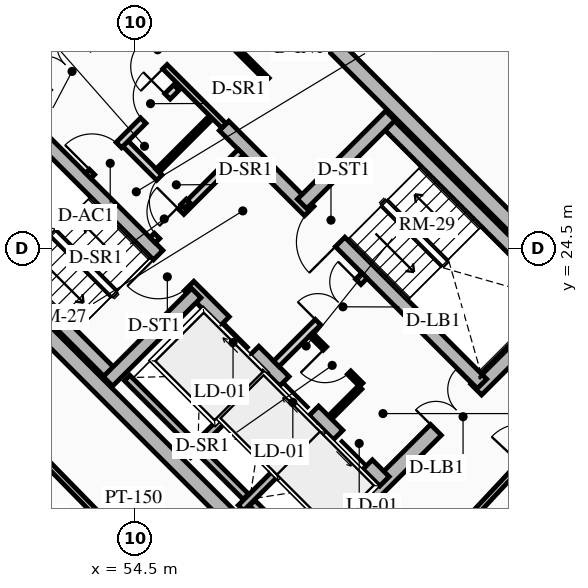
"""IFC4 building model, lengths in metres.
Left out: names, types, materials, properties, quantities, classifications, styles, units other than length and angle.
Written with IfcOpenShell. Run it as: python <this file> out.ifc"""

import sys

from ifc_helpers import new_model, si_unit, direction, frame, frame_2d, origin, place, context, subcontext, project, spatial, rectangle, extrude, source, transform, mapped, element, fill, save


model = new_model("IFC4")
c1 = context("Model", 3, precision=1e-05, world=origin(), true_north=direction((0.0, 1.0)))
c2 = subcontext(c1, "Body", "Model", "MODEL_VIEW")
j1 = project(units=[si_unit("LENGTHUNIT", "METRE"), si_unit("PLANEANGLEUNIT", "RADIAN")], contexts=[c1])
p1 = place(None, origin())
s1 = spatial("IfcSite", under=j1, at=p1, CompositionType="ELEMENT")
p2 = place(p1, origin())
s2 = spatial("IfcBuilding", under=s1, at=p2, CompositionType="ELEMENT")
p3 = place(p2, frame((0.0, 0.0, 154.51)))
s3 = spatial("IfcBuildingStorey", under=s2, at=p3, CompositionType="ELEMENT", Elevation=154.51)
for number, where, z_axis, x_axis in (
    (1, (58.702, 15.732, 0.0), (0.0, 0.0, 1.0), (-0.707, 0.707, 0.0)),
    (2, (66.268, 23.298, 0.0), (0.0, 0.0, 1.0), (-0.707, 0.707, 0.0)),
):
    element("IfcWall", number, at=place(p3, frame(where, z_axis=z_axis, x_axis=x_axis)), inside=s3, PredefinedType="SHEAR", context=c2, shape_type="SweptSolid", body=[
        extrude(rectangle(XDim=14.1, YDim=0.4, at=frame_2d((7.05, 0.0))), origin(), (0.0, 0.0, 1.0), 2.91),
    ])
p4 = place(p3, frame((58.561, 15.873, 0.0), z_axis=(0.0, 0.0, 1.0), x_axis=(0.707106781187, 0.707106781187, 0.0)))
e3 = element("IfcWall", 3, at=p4, inside=s3, PredefinedType="SHEAR", context=c2, shape_type="SweptSolid", body=[
    extrude(rectangle(XDim=10.7, YDim=0.4, at=frame_2d((5.35, 0.0))), origin(), (0.0, 0.0, 1.0), 2.91),
])
m1 = source(origin(), c2, "Body", "SweptSolid", [
    extrude(rectangle(XDim=1.5, YDim=2.02, at=frame_2d((0.75, 1.01))), frame((0.0, 0.21, 0.0), z_axis=(0.0, -1.0, 0.0), x_axis=(1.0, 0.0, 0.0)), (0.0, 0.0, 1.0), 0.42),
])
p5 = place(p4, frame((5.45, 0.0, 0.0)))
e4 = element("IfcOpeningElement", 4, at=p5, cuts=e3, PredefinedType="OPENING", context=c2, shape_type="MappedRepresentation", body=[
    mapped(m1, transform((0.0, 0.0, 0.0), x_axis=(1.0, 0.0, 0.0), y_axis=(0.0, 1.0, 0.0), z_axis=(0.0, 0.0, 1.0), scale=1.0)),
])
p6 = place(p3, frame((48.873, 25.561, 0.0), z_axis=(0.0, 0.0, 1.0), x_axis=(0.707106781187, 0.707106781187, 0.0)))
e5 = element("IfcWall", 5, at=p6, inside=s3, PredefinedType="SHEAR", context=c2, shape_type="SweptSolid", body=[
    extrude(rectangle(XDim=10.7, YDim=0.4, at=frame_2d((5.35, 0.0))), origin(), (0.0, 0.0, 1.0), 2.91),
])
p7 = place(p6, frame((4.6, 0.0, 0.0)))
e6 = element("IfcOpeningElement", 6, at=p7, cuts=e5, PredefinedType="OPENING", context=c2, shape_type="MappedRepresentation", body=[
    mapped(m1, transform((0.0, 0.0, 0.0), x_axis=(1.0, 0.0, 0.0), y_axis=(0.0, 1.0, 0.0), z_axis=(0.0, 0.0, 1.0), scale=1.0)),
])
p8 = place(p3, frame((61.06, 18.373, 0.0), z_axis=(0.0, 0.0, 1.0), x_axis=(-0.707106781187, 0.707106781187, 0.0)))
e7 = element("IfcWall", 7, at=p8, inside=s3, PredefinedType="SHEAR", context=c2, shape_type="SweptSolid", body=[
    extrude(rectangle(XDim=13.7, YDim=0.35, at=frame_2d((6.85, 0.0))), origin(), (0.0, 0.0, 1.0), 2.91),
])
m2 = source(origin(), c2, "Body", "SweptSolid", [
    extrude(rectangle(XDim=1.1, YDim=2.015, at=frame_2d((0.55, 1.007))), frame((0.0, 0.185, 0.0), z_axis=(0.0, -1.0, 0.0), x_axis=(1.0, 0.0, 0.0)), (0.0, 0.0, 1.0), 0.37),
])
p9 = place(p8, frame((4.85, 0.0, 0.0)))
e8 = element("IfcOpeningElement", 8, at=p9, cuts=e7, PredefinedType="OPENING", context=c2, shape_type="MappedRepresentation", body=[
    mapped(m2, transform((0.0, 0.0, 0.0), x_axis=(1.0, 0.0, 0.0), y_axis=(0.0, 1.0, 0.0), z_axis=(0.0, 0.0, 1.0), scale=1.0)),
])
p10 = place(p8, frame((0.625, 0.0, 0.0)))
e9 = element("IfcOpeningElement", 9, at=p10, cuts=e7, PredefinedType="OPENING", context=c2, shape_type="MappedRepresentation", body=[
    mapped(m2, transform((0.0, 0.0, 0.0), x_axis=(1.0, 0.0, 0.0), y_axis=(0.0, 1.0, 0.0), z_axis=(0.0, 0.0, 1.0), scale=1.0)),
])
p11 = place(p8, frame((2.625, 0.0, 0.0)))
e10 = element("IfcOpeningElement", 10, at=p11, cuts=e7, PredefinedType="OPENING", context=c2, shape_type="MappedRepresentation", body=[
    mapped(m2, transform((0.0, 0.0, 0.0), x_axis=(1.0, 0.0, 0.0), y_axis=(0.0, 1.0, 0.0), z_axis=(0.0, 0.0, 1.0), scale=1.0)),
])
m3 = source(origin(), c2, "Body", "SweptSolid", [
    extrude(rectangle(XDim=1.15, YDim=2.02, at=frame_2d((0.575, 1.01))), frame((0.0, 0.185, 0.0), z_axis=(0.0, -1.0, 0.0), x_axis=(1.0, 0.0, 0.0)), (0.0, 0.0, 1.0), 0.37),
])
p12 = place(p8, frame((7.27, 0.0, 0.0)))
e11 = element("IfcOpeningElement", 11, at=p12, cuts=e7, PredefinedType="OPENING", context=c2, shape_type="MappedRepresentation", body=[
    mapped(m3, transform((0.0, 0.0, 0.0), x_axis=(1.0, 0.0, 0.0), y_axis=(0.0, 1.0, 0.0), z_axis=(0.0, 0.0, 1.0), scale=1.0)),
])
p13 = place(p3, frame((63.627, 20.94, 0.0), z_axis=(0.0, 0.0, 1.0), x_axis=(-0.707119496762, 0.707094065383, 0.0)))
e12 = element("IfcWall", 12, at=p13, inside=s3, PredefinedType="SHEAR", context=c2, shape_type="SweptSolid", body=[
    extrude(rectangle(XDim=9.6, YDim=0.35, at=frame_2d((4.8, 0.0))), origin(), (0.0, 0.0, 1.0), 2.91),
])
p14 = place(p13, frame((5.28, 0.0, 0.0)))
e13 = element("IfcOpeningElement", 13, at=p14, cuts=e12, PredefinedType="OPENING", context=c2, shape_type="MappedRepresentation", body=[
    mapped(m3, transform((0.0, 0.0, 0.0), x_axis=(1.0, 0.0, 0.0), y_axis=(0.0, 1.0, 0.0), z_axis=(0.0, 0.0, 1.0), scale=1.0)),
])
p15 = place(p3, frame((53.922, 21.141, 0.0), z_axis=(0.0, 0.0, 1.0), x_axis=(-0.707106781187, 0.707106781187, 0.0)))
e14 = element("IfcWall", 14, at=p15, inside=s3, PredefinedType="SHEAR", context=c2, shape_type="SweptSolid", body=[
    extrude(rectangle(XDim=6.695, YDim=0.35, at=frame_2d((3.348, 0.0))), origin(), (0.0, 0.0, 1.0), 2.91),
])
p16 = place(p3, frame((53.784, 21.003, 0.0), z_axis=(0.0, 0.0, 1.0), x_axis=(0.707106781187, 0.707106781187, 0.0)))
e15 = element("IfcWall", 15, at=p16, inside=s3, PredefinedType="SHEAR", context=c2, shape_type="SweptSolid", body=[
    extrude(rectangle(XDim=3.285, YDim=0.35, at=frame_2d((1.643, 0.0))), origin(), (0.0, 0.0, 1.0), 2.91),
])
p17 = place(p3, frame((65.812, 23.125, 0.0), z_axis=(0.0, 0.0, 1.0), x_axis=(-0.707106781187, 0.707106781187, 0.0)))
e16 = element("IfcWall", 16, at=p17, inside=s3, PredefinedType="SHEAR", context=c2, shape_type="SweptSolid", body=[
    extrude(rectangle(XDim=6.695, YDim=0.35, at=frame_2d((3.348, 0.0))), origin(), (0.0, 0.0, 1.0), 2.91),
])
p18 = place(p3, frame((58.893, 25.674, 0.0), z_axis=(0.0, 0.0, 1.0), x_axis=(0.707106781187, 0.707106781187, 0.0)))
e17 = element("IfcWall", 17, at=p18, inside=s3, PredefinedType="SHEAR", context=c2, shape_type="SweptSolid", body=[
    extrude(rectangle(XDim=3.285, YDim=0.35, at=frame_2d((1.643, 0.0))), origin(), (0.0, 0.0, 1.0), 2.91),
])
p19 = place(p3, frame((55.888, 19.069, 0.0), z_axis=(0.0, 0.0, 1.0), x_axis=(0.707106781187, 0.707106781187, 0.0)))
e18 = element("IfcWall", 18, at=p19, inside=s3, PredefinedType="SHEAR", context=c2, shape_type="SweptSolid", body=[
    extrude(rectangle(XDim=2.97, YDim=0.2, at=frame_2d((1.485, 0.0))), origin(), (0.0, 0.0, 1.0), 2.91),
])
p20 = place(p3, frame((56.015, 19.366, 0.0), z_axis=(0.0, 0.0, 1.0), x_axis=(-0.707106781187, 0.707106781187, 0.0)))
e19 = element("IfcWall", 19, at=p20, inside=s3, PredefinedType="SHEAR", context=c2, shape_type="SweptSolid", body=[
    extrude(rectangle(XDim=2.44, YDim=0.2, at=frame_2d((1.22, 0.0))), origin(), (0.0, 0.0, 1.0), 2.91),
])
p21 = place(p3, frame((57.284, 17.673, 0.0), z_axis=(0.0, 0.0, 1.0), x_axis=(0.707147878904, 0.70706568108, 0.0)))
e20 = element("IfcWall", 20, at=p21, inside=s3, PredefinedType="SHEAR", context=c2, shape_type="SweptSolid", body=[
    extrude(rectangle(XDim=2.97, YDim=0.2, at=frame_2d((1.485, 0.0))), origin(), (0.0, 0.0, 1.0), 2.91),
])
p22 = place(p3, frame((57.412, 17.97, 0.0), z_axis=(0.0, 0.0, 1.0), x_axis=(-0.707106781187, 0.707106781187, 0.0)))
e21 = element("IfcWall", 21, at=p22, inside=s3, PredefinedType="SHEAR", context=c2, shape_type="SweptSolid", body=[
    extrude(rectangle(XDim=1.735, YDim=0.2, at=frame_2d((0.867, 0.0))), origin(), (0.0, 0.0, 1.0), 2.91),
])
p23 = place(p3, frame((58.737, 16.644, 0.0), z_axis=(0.0, 0.0, 1.0), x_axis=(-0.707032117043, 0.707181437447, 0.0)))
e22 = element("IfcWall", 22, at=p23, inside=s3, PredefinedType="SHEAR", context=c2, shape_type="SweptSolid", body=[
    extrude(rectangle(XDim=1.635, YDim=0.2, at=frame_2d((0.817, 0.0))), origin(), (0.0, 0.0, 1.0), 2.91),
])
p24 = place(p3, frame((58.214, 21.467, 0.0), z_axis=(0.0, 0.0, 1.0), x_axis=(0.707106781187, 0.707106781187, 0.0)))
e23 = element("IfcWall", 23, at=p24, inside=s3, PredefinedType="PARTITIONING", context=c2, shape_type="SweptSolid", body=[
    extrude(rectangle(XDim=3.28, YDim=0.2, at=frame_2d((1.64, 0.0))), origin(), (0.0, 0.0, 1.0), 2.675),
])
m4 = source(origin(), c2, "Body", "SweptSolid", [
    extrude(rectangle(XDim=1.5, YDim=2.02, at=frame_2d((0.75, 1.01))), frame((0.0, 0.11, 0.0), z_axis=(0.0, -1.0, 0.0), x_axis=(1.0, 0.0, 0.0)), (0.0, 0.0, 1.0), 0.22),
])
p25 = place(p24, frame((1.55, 0.0, 0.0)))
e24 = element("IfcOpeningElement", 24, at=p25, cuts=e23, PredefinedType="OPENING", context=c2, shape_type="MappedRepresentation", body=[
    mapped(m4, transform((0.0, 0.0, 0.0), x_axis=(1.0, 0.0, 0.0), y_axis=(0.0, 1.0, 0.0), z_axis=(0.0, 0.0, 1.0), scale=1.0)),
])
p26 = place(p3, frame((54.961, 24.719, 0.0), z_axis=(0.0, 0.0, 1.0), x_axis=(0.707106781187, 0.707106781187, 0.0)))
e25 = element("IfcWall", 25, at=p26, inside=s3, PredefinedType="PARTITIONING", context=c2, shape_type="SweptSolid", body=[
    extrude(rectangle(XDim=3.28, YDim=0.2, at=frame_2d((1.64, 0.0))), origin(), (0.0, 0.0, 1.0), 2.675),
])
m5 = source(origin(), c2, "Body", "SweptSolid", [
    extrude(rectangle(XDim=0.9, YDim=2.005, at=frame_2d((0.45, 1.002))), frame((0.0, 0.11, 0.0), z_axis=(0.0, -1.0, 0.0), x_axis=(1.0, 0.0, 0.0)), (0.0, 0.0, 1.0), 0.22),
])
p27 = place(p26, frame((0.16, 0.0, 0.0)))
e26 = element("IfcOpeningElement", 26, at=p27, cuts=e25, PredefinedType="OPENING", context=c2, shape_type="MappedRepresentation", body=[
    mapped(m5, transform((0.0, 0.0, 0.0), x_axis=(1.0, 0.0, 0.0), y_axis=(0.0, 1.0, 0.0), z_axis=(0.0, 0.0, 1.0), scale=1.0)),
])
p28 = place(p3, frame((55.874, 25.631, 0.0), z_axis=(0.0, 0.0, 1.0), x_axis=(-0.707157639372, 0.707055919343, 0.0)))
e27 = element("IfcWall", 27, at=p28, inside=s3, PredefinedType="PARTITIONING", context=c2, shape_type="SweptSolid", body=[
    extrude(rectangle(XDim=2.4, YDim=0.2, at=frame_2d((1.2, 0.0))), origin(), (0.0, 0.0, 1.0), 2.675),
])
p29 = place(p28, frame((0.14, 0.0, 0.0)))
e28 = element("IfcOpeningElement", 28, at=p29, cuts=e27, PredefinedType="OPENING", context=c2, shape_type="MappedRepresentation", body=[
    mapped(m5, transform((0.0, 0.0, 0.0), x_axis=(1.0, 0.0, 0.0), y_axis=(0.0, 1.0, 0.0), z_axis=(0.0, 0.0, 1.0), scale=1.0)),
])
p30 = place(p3, frame((53.264, 26.416, 0.0), z_axis=(0.0, 0.0, 1.0), x_axis=(0.707106781187, 0.707106781187, 0.0)))
e29 = element("IfcWall", 29, at=p30, inside=s3, PredefinedType="PARTITIONING", context=c2, shape_type="SweptSolid", body=[
    extrude(rectangle(XDim=3.28, YDim=0.2, at=frame_2d((1.64, 0.0))), origin(), (0.0, 0.0, 1.0), 2.675),
])
m6 = source(origin(), c2, "Body", "SweptSolid", [
    extrude(rectangle(XDim=1.0, YDim=2.015, at=frame_2d((0.5, 1.007))), frame((0.0, 0.11, 0.0), z_axis=(0.0, -1.0, 0.0), x_axis=(1.0, 0.0, 0.0)), (0.0, 0.0, 1.0), 0.22),
])
p31 = place(p30, frame((0.14, 0.0, 0.0)))
e30 = element("IfcOpeningElement", 30, at=p31, cuts=e29, PredefinedType="OPENING", context=c2, shape_type="MappedRepresentation", body=[
    mapped(m6, transform((0.0, 0.0, 0.0), x_axis=(1.0, 0.0, 0.0), y_axis=(0.0, 1.0, 0.0), z_axis=(0.0, 0.0, 1.0), scale=1.0)),
])
p32 = place(p30, frame((2.05, 0.0, 0.0)))
e31 = element("IfcOpeningElement", 31, at=p32, cuts=e29, PredefinedType="OPENING", context=c2, shape_type="MappedRepresentation", body=[
    mapped(m5, transform((0.0, 0.0, 0.0), x_axis=(1.0, 0.0, 0.0), y_axis=(0.0, 1.0, 0.0), z_axis=(0.0, 0.0, 1.0), scale=1.0)),
])
p33 = place(p3, frame((60.448, 20.915, 0.0), z_axis=(0.0, 0.0, 1.0), x_axis=(-0.707106781187, 0.707106781187, 0.0)))
e32 = element("IfcWall", 32, at=p33, inside=s3, PredefinedType="PARTITIONING", context=c2, shape_type="SweptSolid", body=[
    extrude(rectangle(XDim=1.87, YDim=0.125, at=frame_2d((0.935, 0.0))), origin(), (0.0, 0.0, 1.0), 2.675),
])
m7 = source(origin(), c2, "Body", "SweptSolid", [
    extrude(rectangle(XDim=0.9, YDim=2.005, at=frame_2d((0.45, 1.002))), frame((0.0, 0.073, 0.0), z_axis=(0.0, -1.0, 0.0), x_axis=(1.0, 0.0, 0.0)), (0.0, 0.0, 1.0), 0.145),
])
p34 = place(p33, frame((0.45, 0.0, 0.0)))
e33 = element("IfcOpeningElement", 33, at=p34, cuts=e32, PredefinedType="OPENING", context=c2, shape_type="MappedRepresentation", body=[
    mapped(m7, transform((0.0, 0.0, 0.0), x_axis=(1.0, 0.0, 0.0), y_axis=(0.0, 1.0, 0.0), z_axis=(0.0, 0.0, 1.0), scale=1.0)),
])
p35 = place(p3, frame((59.643, 20.066, 0.0), z_axis=(0.0, 0.0, 1.0), x_axis=(0.707106781187, 0.707106781187, 0.0)))
e34 = element("IfcWall", 34, at=p35, inside=s3, PredefinedType="PARTITIONING", context=c2, shape_type="SweptSolid", body=[
    extrude(rectangle(XDim=1.1, YDim=0.125, at=frame_2d((0.55, 0.0))), origin(), (0.0, 0.0, 1.0), 2.675),
])
p36 = place(p3, frame((55.089, 26.543, 0.0), z_axis=(0.0, 0.0, 1.0), x_axis=(0.707106781187, 0.707106781187, 0.0)))
e35 = element("IfcWall", 35, at=p36, inside=s3, PredefinedType="PARTITIONING", context=c2, shape_type="SweptSolid", body=[
    extrude(rectangle(XDim=1.88, YDim=0.125, at=frame_2d((0.94, 0.0))), origin(), (0.0, 0.0, 1.0), 2.675),
])
p37 = place(p3, frame((56.839, 27.728, 0.0), z_axis=(0.0, 0.0, 1.0), x_axis=(-0.707106781187, 0.707106781187, 0.0)))
e36 = element("IfcWall", 36, at=p37, inside=s3, PredefinedType="PARTITIONING", context=c2, shape_type="SweptSolid", body=[
    extrude(rectangle(XDim=3.9, YDim=0.16, at=frame_2d((1.95, 0.0))), origin(), (0.0, 0.0, 1.0), 2.675),
])
m8 = source(origin(), c2, "Body", "SweptSolid", [
    extrude(rectangle(XDim=0.9, YDim=2.005, at=frame_2d((0.45, 1.002))), frame((0.0, 0.09, 0.0), z_axis=(0.0, -1.0, 0.0), x_axis=(1.0, 0.0, 0.0)), (0.0, 0.0, 1.0), 0.18),
])
p38 = place(p37, frame((2.2, 0.0, 0.0)))
e37 = element("IfcOpeningElement", 37, at=p38, cuts=e36, PredefinedType="OPENING", context=c2, shape_type="MappedRepresentation", body=[
    mapped(m8, transform((0.0, 0.0, 0.0), x_axis=(1.0, 0.0, 0.0), y_axis=(0.0, 1.0, 0.0), z_axis=(0.0, 0.0, 1.0), scale=1.0)),
])
p39 = place(p3, frame((57.981, 28.941, 0.0), z_axis=(0.0, 0.0, 1.0), x_axis=(-0.707074823725, 0.707138737204, 0.0)))
e38 = element("IfcWall", 38, at=p39, inside=s3, PredefinedType="PARTITIONING", context=c2, shape_type="SweptSolid", body=[
    extrude(rectangle(XDim=3.82, YDim=0.125, at=frame_2d((1.91, 0.0))), origin(), (0.0, 0.0, 1.0), 2.675),
])
p40 = place(p39, frame((1.45, 0.0, 0.0)))
e39 = element("IfcOpeningElement", 39, at=p40, cuts=e38, PredefinedType="OPENING", context=c2, shape_type="MappedRepresentation", body=[
    mapped(m7, transform((0.0, 0.0, 0.0), x_axis=(1.0, 0.0, 0.0), y_axis=(0.0, 1.0, 0.0), z_axis=(0.0, 0.0, 1.0), scale=1.0)),
])
p41 = place(p3, frame((52.02, 19.02, 0.0), z_axis=(0.0, 0.0, 1.0), x_axis=(0.699456449804, -0.71467522332, 0.0)))
e40 = element("IfcWall", 40, at=p41, inside=s3, PredefinedType="PARTITIONING", context=c2, shape_type="SweptSolid", body=[
    extrude(rectangle(XDim=6.032, YDim=0.15, at=frame_2d((3.016, 0.0))), origin(), (0.0, 0.0, 1.0), 2.245),
])
p42 = place(p3, frame((62.784, 16.83, 0.0), z_axis=(0.0, 0.0, 1.0), x_axis=(0.682240832942, 0.731127516831, 0.0)))
e41 = element("IfcWall", 41, at=p42, inside=s3, PredefinedType="PARTITIONING", context=c2, shape_type="SweptSolid", body=[
    extrude(rectangle(XDim=6.517, YDim=0.15, at=frame_2d((3.259, 0.0))), origin(), (0.0, 0.0, 1.0), 2.245),
])
m9 = source(origin(), c2, "Body", "SweptSolid", [
    extrude(rectangle(XDim=1.05, YDim=2.015, at=frame_2d((0.525, 1.007))), frame((0.0, 0.085, 0.0), z_axis=(0.0, -1.0, 0.0), x_axis=(1.0, 0.0, 0.0)), (0.0, 0.0, 1.0), 0.17),
])
p43 = place(p42, frame((2.734, 0.0, 0.0)))
e42 = element("IfcOpeningElement", 42, at=p43, cuts=e41, PredefinedType="OPENING", context=c2, shape_type="MappedRepresentation", body=[
    mapped(m9, transform((0.0, 0.0, 0.0), x_axis=(1.0, 0.0, 0.0), y_axis=(0.0, 1.0, 0.0), z_axis=(0.0, 0.0, 1.0), scale=1.0)),
])
m10 = source(origin(), c2, "Body", "SweptSolid", [
    extrude(rectangle(XDim=1.1, YDim=2.015, at=frame_2d((0.55, 1.007))), frame((0.0, 0.025, 0.0), z_axis=(0.0, -1.0, 0.0), x_axis=(1.0, 0.0, 0.0)), (0.0, 0.0, 1.0), 0.05),
])
p44 = place(p9, origin())
e43 = element("IfcDoor", 43, at=p44, inside=s3, OperationType="SLIDING_TO_RIGHT", PredefinedType="DOOR", context=c2, shape_type="MappedRepresentation", body=[
    mapped(m10, transform((0.0, 0.0, 0.0), x_axis=(1.0, 0.0, 0.0), y_axis=(0.0, 1.0, 0.0), z_axis=(0.0, 0.0, 1.0), scale=1.0)),
])
fill(e8, e43)
p45 = place(p10, origin())
e44 = element("IfcDoor", 44, at=p45, inside=s3, OperationType="SLIDING_TO_LEFT", PredefinedType="DOOR", context=c2, shape_type="MappedRepresentation", body=[
    mapped(m10, transform((0.0, 0.0, 0.0), x_axis=(1.0, 0.0, 0.0), y_axis=(0.0, 1.0, 0.0), z_axis=(0.0, 0.0, 1.0), scale=1.0)),
])
fill(e9, e44)
p46 = place(p11, origin())
e45 = element("IfcDoor", 45, at=p46, inside=s3, OperationType="SLIDING_TO_RIGHT", PredefinedType="DOOR", context=c2, shape_type="MappedRepresentation", body=[
    mapped(m10, transform((0.0, 0.0, 0.0), x_axis=(1.0, 0.0, 0.0), y_axis=(0.0, 1.0, 0.0), z_axis=(0.0, 0.0, 1.0), scale=1.0)),
])
fill(e10, e45)
m11 = source(origin(), c2, "Body", "SweptSolid", [
    extrude(rectangle(XDim=1.15, YDim=2.02, at=frame_2d((0.575, 1.01))), frame((0.0, 0.025, 0.0), z_axis=(0.0, -1.0, 0.0), x_axis=(1.0, 0.0, 0.0)), (0.0, 0.0, 1.0), 0.05),
])
p47 = place(p12, origin())
e46 = element("IfcDoor", 46, at=p47, inside=s3, OperationType="SINGLE_SWING_RIGHT", PredefinedType="DOOR", context=c2, shape_type="MappedRepresentation", body=[
    mapped(m11, transform((0.0, 0.0, 0.0), x_axis=(1.0, 0.0, 0.0), y_axis=(0.0, 1.0, 0.0), z_axis=(0.0, 0.0, 1.0), scale=1.0)),
])
fill(e11, e46)
p48 = place(p14, origin())
e47 = element("IfcDoor", 47, at=p48, inside=s3, OperationType="SINGLE_SWING_LEFT", PredefinedType="DOOR", context=c2, shape_type="MappedRepresentation", body=[
    mapped(m11, transform((0.0, 0.0, 0.0), x_axis=(1.0, 0.0, 0.0), y_axis=(0.0, 1.0, 0.0), z_axis=(0.0, 0.0, 1.0), scale=1.0)),
])
fill(e13, e47)
m12 = source(origin(), c2, "Body", "SweptSolid", [
    extrude(rectangle(XDim=1.5, YDim=2.02, at=frame_2d((0.75, 1.01))), frame((0.0, 0.025, 0.0), z_axis=(0.0, -1.0, 0.0), x_axis=(1.0, 0.0, 0.0)), (0.0, 0.0, 1.0), 0.05),
])
p49 = place(p7, origin())
e48 = element("IfcDoor", 48, at=p49, inside=s3, OperationType="DOUBLE_DOOR_SINGLE_SWING", PredefinedType="DOOR", context=c2, shape_type="MappedRepresentation", body=[
    mapped(m12, transform((0.0, 0.0, 0.0), x_axis=(1.0, 0.0, 0.0), y_axis=(0.0, 1.0, 0.0), z_axis=(0.0, 0.0, 1.0), scale=1.0)),
])
fill(e6, e48)
p50 = place(p5, origin())
e49 = element("IfcDoor", 49, at=p50, inside=s3, OperationType="DOUBLE_DOOR_SINGLE_SWING", PredefinedType="DOOR", context=c2, shape_type="MappedRepresentation", body=[
    mapped(m12, transform((0.0, 0.0, 0.0), x_axis=(1.0, 0.0, 0.0), y_axis=(0.0, 1.0, 0.0), z_axis=(0.0, 0.0, 1.0), scale=1.0)),
])
fill(e4, e49)
p51 = place(p25, origin())
e50 = element("IfcDoor", 50, at=p51, inside=s3, OperationType="DOUBLE_DOOR_SINGLE_SWING", PredefinedType="DOOR", context=c2, shape_type="MappedRepresentation", body=[
    mapped(m12, transform((0.0, 0.0, 0.0), x_axis=(1.0, 0.0, 0.0), y_axis=(0.0, 1.0, 0.0), z_axis=(0.0, 0.0, 1.0), scale=1.0)),
])
fill(e24, e50)
m13 = source(origin(), c2, "Body", "SweptSolid", [
    extrude(rectangle(XDim=0.9, YDim=2.005, at=frame_2d((0.45, 1.002))), frame((0.0, 0.025, 0.0), z_axis=(0.0, -1.0, 0.0), x_axis=(1.0, 0.0, 0.0)), (0.0, 0.0, 1.0), 0.05),
])
p52 = place(p27, origin())
e51 = element("IfcDoor", 51, at=p52, inside=s3, OperationType="SINGLE_SWING_RIGHT", PredefinedType="DOOR", context=c2, shape_type="MappedRepresentation", body=[
    mapped(m13, transform((0.0, 0.0, 0.0), x_axis=(1.0, 0.0, 0.0), y_axis=(0.0, 1.0, 0.0), z_axis=(0.0, 0.0, 1.0), scale=1.0)),
])
fill(e26, e51)
m14 = source(origin(), c2, "Body", "SweptSolid", [
    extrude(rectangle(XDim=1.0, YDim=2.015, at=frame_2d((0.5, 1.007))), frame((0.0, 0.025, 0.0), z_axis=(0.0, -1.0, 0.0), x_axis=(1.0, 0.0, 0.0)), (0.0, 0.0, 1.0), 0.05),
])
p53 = place(p31, origin())
e52 = element("IfcDoor", 52, at=p53, inside=s3, OperationType="SINGLE_SWING_LEFT", PredefinedType="DOOR", context=c2, shape_type="MappedRepresentation", body=[
    mapped(m14, transform((0.0, 0.0, 0.0), x_axis=(1.0, 0.0, 0.0), y_axis=(0.0, 1.0, 0.0), z_axis=(0.0, 0.0, 1.0), scale=1.0)),
])
fill(e30, e52)
p54 = place(p34, origin())
e53 = element("IfcDoor", 53, at=p54, inside=s3, OperationType="SINGLE_SWING_RIGHT", PredefinedType="DOOR", context=c2, shape_type="MappedRepresentation", body=[
    mapped(m13, transform((0.0, 0.0, 0.0), x_axis=(1.0, 0.0, 0.0), y_axis=(0.0, 1.0, 0.0), z_axis=(0.0, 0.0, 1.0), scale=1.0)),
])
fill(e33, e53)
p55 = place(p29, origin())
e54 = element("IfcDoor", 54, at=p55, inside=s3, OperationType="SINGLE_SWING_LEFT", PredefinedType="DOOR", context=c2, shape_type="MappedRepresentation", body=[
    mapped(m13, transform((0.0, 0.0, 0.0), x_axis=(1.0, 0.0, 0.0), y_axis=(0.0, 1.0, 0.0), z_axis=(0.0, 0.0, 1.0), scale=1.0)),
])
fill(e28, e54)
p56 = place(p32, origin())
e55 = element("IfcDoor", 55, at=p56, inside=s3, OperationType="SINGLE_SWING_RIGHT", PredefinedType="DOOR", context=c2, shape_type="MappedRepresentation", body=[
    mapped(m13, transform((0.0, 0.0, 0.0), x_axis=(1.0, 0.0, 0.0), y_axis=(0.0, 1.0, 0.0), z_axis=(0.0, 0.0, 1.0), scale=1.0)),
])
fill(e31, e55)
p57 = place(p38, origin())
e56 = element("IfcDoor", 56, at=p57, inside=s3, OperationType="SINGLE_SWING_LEFT", PredefinedType="DOOR", context=c2, shape_type="MappedRepresentation", body=[
    mapped(m13, transform((0.0, 0.0, 0.0), x_axis=(1.0, 0.0, 0.0), y_axis=(0.0, 1.0, 0.0), z_axis=(0.0, 0.0, 1.0), scale=1.0)),
])
fill(e37, e56)
save(model, sys.argv[1])
